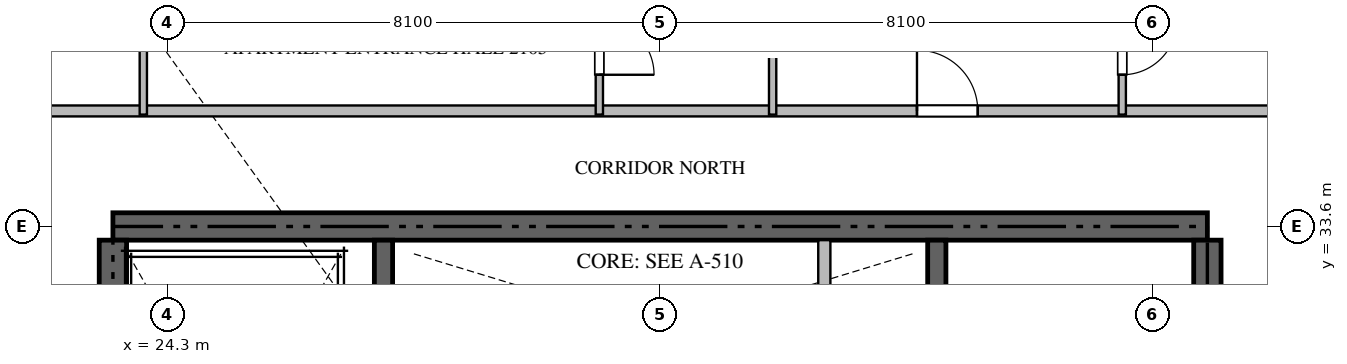
"""IFC4 building model, lengths in metres.
Left out: names, types, materials, properties, quantities, classifications, styles, units other than length and angle.
Written with IfcOpenShell. Run it as: python <this file> out.ifc"""

import sys

from ifc_helpers import new_model, si_unit, direction, frame, frame_2d, origin, place, context, subcontext, project, spatial, rectangle, extrude, source, transform, mapped, element, fill, save


model = new_model("IFC4")
c1 = context("Model", 3, precision=1e-05, world=origin(), true_north=direction((0.0, 1.0)))
c2 = subcontext(c1, "Body", "Model", "MODEL_VIEW")
j1 = project(units=[si_unit("LENGTHUNIT", "METRE"), si_unit("PLANEANGLEUNIT", "RADIAN")], contexts=[c1])
p1 = place(None, origin())
s1 = spatial("IfcSite", under=j1, at=p1, CompositionType="ELEMENT")
p2 = place(p1, origin())
s2 = spatial("IfcBuilding", under=s1, at=p2, CompositionType="ELEMENT")
p3 = place(p2, frame((0.0, 0.0, 86.7)))
s3 = spatial("IfcBuildingStorey", under=s2, at=p3, CompositionType="ELEMENT", Elevation=86.7)
p4 = place(p3, frame((41.4, 33.6, -0.26), z_axis=(0.0, 0.0, 1.0), x_axis=(-1.0, 0.0, 0.0)))
e1 = element("IfcWall", 1, at=p4, inside=s3, PredefinedType="SHEAR", context=c2, shape_type="SweptSolid", body=[
    extrude(rectangle(XDim=18.0, YDim=0.45, at=frame_2d((9.0, 0.0))), origin(), (0.0, 0.0, 1.0), 3.748),
])
p5 = place(p3, frame((23.4, 24.25, -0.26), z_axis=(0.0, 0.0, 1.0), x_axis=(0.0, 1.0, 0.0)))
e2 = element("IfcWall", 2, at=p5, inside=s3, PredefinedType="SHEAR", context=c2, shape_type="SweptSolid", body=[
    extrude(rectangle(XDim=9.125, YDim=0.45, at=frame_2d((4.562, 0.0))), origin(), (0.0, 0.0, 1.0), 3.748),
])
p6 = place(p3, frame((41.4, 27.75, -0.26), z_axis=(0.0, 0.0, 1.0), x_axis=(0.0, 1.0, 0.0)))
e3 = element("IfcWall", 3, at=p6, inside=s3, PredefinedType="SHEAR", context=c2, shape_type="SweptSolid", body=[
    extrude(rectangle(XDim=5.625, YDim=0.45, at=frame_2d((2.812, 0.0))), origin(), (0.0, 0.0, 1.0), 3.748),
])
p7 = place(p3, frame((27.85, 23.55, -0.26), z_axis=(0.0, 0.0, 1.0), x_axis=(0.0, 1.0, 0.0)))
e4 = element("IfcWall", 4, at=p7, inside=s3, PredefinedType="SHEAR", context=c2, shape_type="SweptSolid", body=[
    extrude(rectangle(XDim=9.825, YDim=0.3, at=frame_2d((4.913, 0.0))), origin(), (0.0, 0.0, 1.0), 3.748),
])
p8 = place(p3, frame((36.95, 27.05, -0.26), z_axis=(0.0, 0.0, 1.0), x_axis=(0.0, 1.0, 0.0)))
e5 = element("IfcWall", 5, at=p8, inside=s3, PredefinedType="SHEAR", context=c2, shape_type="SweptSolid", body=[
    extrude(rectangle(XDim=6.325, YDim=0.3, at=frame_2d((3.163, 0.0))), origin(), (0.0, 0.0, 1.0), 3.748),
])
p9 = place(p3, frame((35.1, 30.75, 0.0), z_axis=(0.0, 0.0, 1.0), x_axis=(0.0, 1.0, 0.0)))
e6 = element("IfcWall", 6, at=p9, inside=s3, PredefinedType="STANDARD", context=c2, shape_type="SweptSolid", body=[
    extrude(rectangle(XDim=2.625, YDim=0.2, at=frame_2d((1.312, 0.0))), origin(), (0.0, 0.0, 1.0), 3.49),
])
p10 = place(p3, frame((21.402, 35.5, 0.0), z_axis=(0.0, 0.0, 1.0), x_axis=(1.0, 0.0, 0.0)))
e7 = element("IfcWall", 7, at=p10, inside=s3, PredefinedType="PARTITIONING", context=c2, shape_type="SweptSolid", body=[
    extrude(rectangle(XDim=21.996, YDim=0.18, at=frame_2d((10.998, 0.0))), origin(), (0.0, 0.0, 1.0), 3.49),
])
p11 = place(p10, frame((15.222, 0.0, 0.0)))
e8 = element("IfcOpeningElement", 8, at=p11, cuts=e7, PredefinedType="OPENING", context=c2, shape_type="SweptSolid", body=[
    extrude(rectangle(XDim=1.0, YDim=2.15, at=frame_2d((0.5, 1.075))), frame((0.0, 0.1, 0.0), z_axis=(0.0, -1.0, 0.0), x_axis=(1.0, 0.0, 0.0)), (0.0, 0.0, 1.0), 0.2),
])
p12 = place(p3, frame((34.25, 38.25, 0.0), z_axis=(0.0, 0.0, 1.0), x_axis=(0.0, -1.0, 0.0)))
e9 = element("IfcWall", 9, at=p12, inside=s3, PredefinedType="PARTITIONING", context=c2, shape_type="SweptSolid", body=[
    extrude(rectangle(XDim=2.81, YDim=0.12, at=frame_2d((1.405, 0.0))), origin(), (0.0, 0.0, 1.0), 3.49),
])
p13 = place(p3, frame((31.4, 37.65, 0.0), z_axis=(0.0, 0.0, 1.0), x_axis=(0.0, -1.0, 0.0)))
e10 = element("IfcWall", 10, at=p13, inside=s3, PredefinedType="PARTITIONING", context=c2, shape_type="SweptSolid", body=[
    extrude(rectangle(XDim=2.21, YDim=0.12, at=frame_2d((1.105, 0.0))), origin(), (0.0, 0.0, 1.0), 3.49),
])
p14 = place(p13, frame((0.655, 0.0, 0.0)))
e11 = element("IfcOpeningElement", 11, at=p14, cuts=e10, PredefinedType="OPENING", context=c2, shape_type="SweptSolid", body=[
    extrude(rectangle(XDim=0.9, YDim=2.1, at=frame_2d((0.45, 1.05))), frame((0.0, 0.07, 0.0), z_axis=(0.0, -1.0, 0.0), x_axis=(1.0, 0.0, 0.0)), (0.0, 0.0, 1.0), 0.14),
])
p15 = place(p3, frame((23.9, 37.648, 0.0), z_axis=(0.0, 0.0, 1.0), x_axis=(0.0, -1.0, 0.0)))
e12 = element("IfcWall", 12, at=p15, inside=s3, PredefinedType="PARTITIONING", context=c2, shape_type="SweptSolid", body=[
    extrude(rectangle(XDim=2.208, YDim=0.12, at=frame_2d((1.104, 0.0))), origin(), (0.0, 0.0, 1.0), 3.49),
])
p16 = place(p3, frame((40.0, 37.65, 0.0), z_axis=(0.0, 0.0, 1.0), x_axis=(0.0, -1.0, 0.0)))
e13 = element("IfcWall", 13, at=p16, inside=s3, PredefinedType="PARTITIONING", context=c2, shape_type="SweptSolid", body=[
    extrude(rectangle(XDim=2.21, YDim=0.12, at=frame_2d((1.105, 0.0))), origin(), (0.0, 0.0, 1.0), 3.49),
])
p17 = place(p16, frame((0.655, 0.0, 0.0)))
e14 = element("IfcOpeningElement", 14, at=p17, cuts=e13, PredefinedType="OPENING", context=c2, shape_type="SweptSolid", body=[
    extrude(rectangle(XDim=0.9, YDim=2.1, at=frame_2d((0.45, 1.05))), frame((0.0, 0.07, 0.0), z_axis=(0.0, -1.0, 0.0), x_axis=(1.0, 0.0, 0.0)), (0.0, 0.0, 1.0), 0.14),
])
m1 = source(origin(), c2, "Body", "SweptSolid", [
    extrude(rectangle(XDim=1.0, YDim=2.15, at=frame_2d((0.5, 1.075))), frame((0.0, 0.025, 0.0), z_axis=(0.0, -1.0, 0.0), x_axis=(1.0, 0.0, 0.0)), (0.0, 0.0, 1.0), 0.05),
])
p18 = place(p11, origin())
e15 = element("IfcDoor", 15, at=p18, inside=s3, OperationType="SINGLE_SWING_LEFT", PredefinedType="DOOR", context=c2, shape_type="MappedRepresentation", body=[
    mapped(m1, transform((0.0, 0.0, 0.0), scale=1.0)),
])
fill(e8, e15)
m2 = source(origin(), c2, "Body", "SweptSolid", [
    extrude(rectangle(XDim=0.9, YDim=2.1, at=frame_2d((0.45, 1.05))), frame((0.0, 0.025, 0.0), z_axis=(0.0, -1.0, 0.0), x_axis=(1.0, 0.0, 0.0)), (0.0, 0.0, 1.0), 0.05),
])
p19 = place(p14, origin())
e16 = element("IfcDoor", 16, at=p19, inside=s3, OperationType="SINGLE_SWING_RIGHT", PredefinedType="DOOR", context=c2, shape_type="MappedRepresentation", body=[
    mapped(m2, transform((0.0, 0.0, 0.0), scale=1.0)),
])
fill(e11, e16)
p20 = place(p17, origin())
e17 = element("IfcDoor", 17, at=p20, inside=s3, OperationType="SINGLE_SWING_LEFT", PredefinedType="DOOR", context=c2, shape_type="MappedRepresentation", body=[
    mapped(m2, transform((0.0, 0.0, 0.0), scale=1.0)),
])
fill(e14, e17)
save(model, sys.argv[1])
